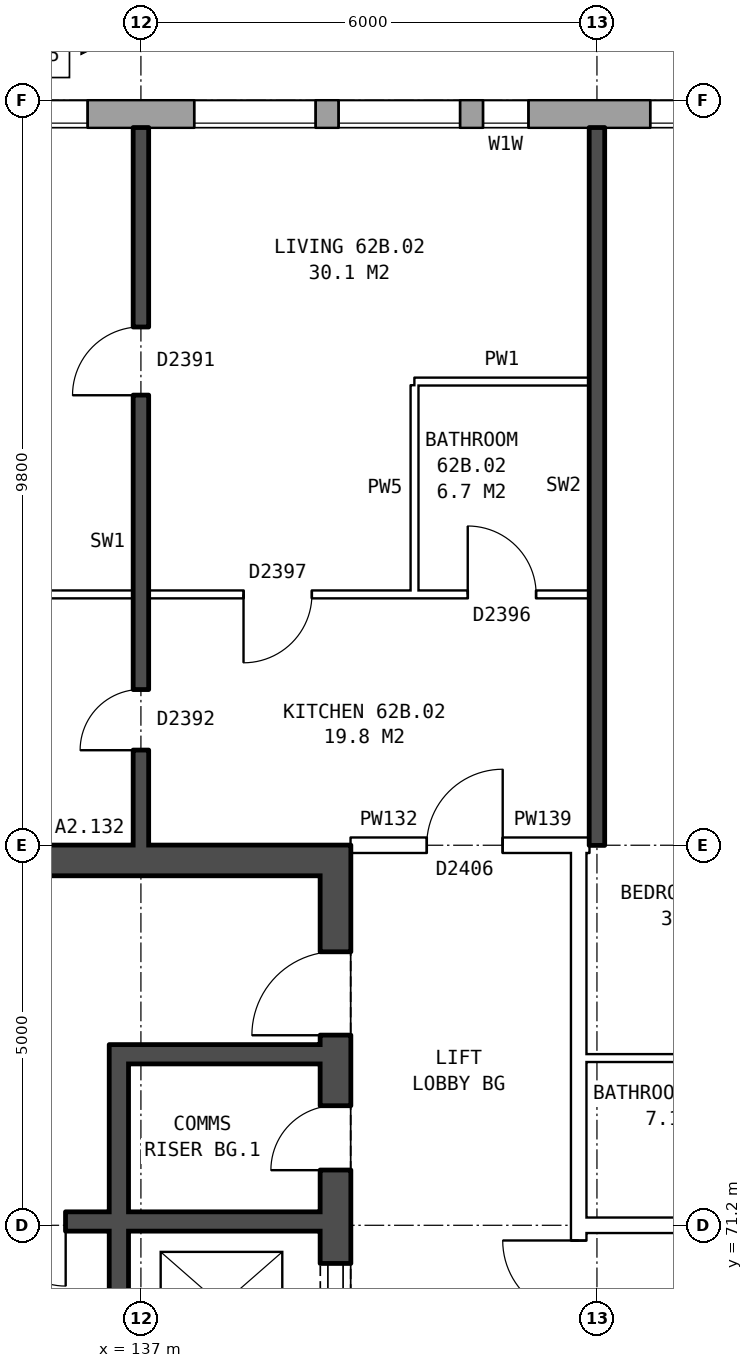
"""IFC4 building model, lengths in metres.
Left out: names, types, materials, properties, quantities, classifications, styles, units other than length and angle.
Written with IfcOpenShell. Run it as: python <this file> out.ifc"""

import sys

from ifc_helpers import new_model, si_unit, direction, frame, frame_2d, origin, place, context, subcontext, project, spatial, rectangle, extrude, element, fill, save


model = new_model("IFC4")
c1 = context("Model", 3, precision=1e-05, world=origin(), true_north=direction((0.0, 1.0)))
c2 = subcontext(c1, "Body", "Model", "MODEL_VIEW")
j1 = project(units=[si_unit("LENGTHUNIT", "METRE"), si_unit("PLANEANGLEUNIT", "RADIAN")], contexts=[c1])
p1 = place(None, origin())
s1 = spatial("IfcSite", under=j1, at=p1, CompositionType="ELEMENT")
p2 = place(p1, origin())
s2 = spatial("IfcBuilding", under=s1, at=p2, CompositionType="ELEMENT")
p3 = place(p2, frame((0.0, 0.0, 221.4)))
s3 = spatial("IfcBuildingStorey", under=s2, at=p3, CompositionType="ELEMENT", Elevation=221.4)
p4 = place(p3, frame((165.925, 85.82, 0.0), z_axis=(0.0, 0.0, 1.0), x_axis=(-1.0, 0.0, 0.0)))
e1 = element("IfcWall", 1, at=p4, inside=s3, PredefinedType="STANDARD", context=c2, shape_type="SweptSolid", body=[
    extrude(rectangle(XDim=33.875, YDim=0.36, at=frame_2d((16.938, 0.0))), origin(), (0.0, 0.0, 1.0), 2.85),
])
p5 = place(p4, frame((2.625, 0.0, 0.8)))
e2 = element("IfcOpeningElement", 2, at=p5, cuts=e1, PredefinedType="OPENING", context=c2, shape_type="SweptSolid", body=[
    extrude(rectangle(XDim=1.6, YDim=1.8, at=frame_2d((0.8, 0.9))), frame((0.0, 0.19, 0.0), z_axis=(0.0, -1.0, 0.0), x_axis=(1.0, 0.0, 0.0)), (0.0, 0.0, 1.0), 0.38),
])
p6 = place(p4, frame((5.625, 0.0, 0.8)))
e3 = element("IfcOpeningElement", 3, at=p6, cuts=e1, PredefinedType="OPENING", context=c2, shape_type="SweptSolid", body=[
    extrude(rectangle(XDim=1.6, YDim=1.8, at=frame_2d((0.8, 0.9))), frame((0.0, 0.19, 0.0), z_axis=(0.0, -1.0, 0.0), x_axis=(1.0, 0.0, 0.0)), (0.0, 0.0, 1.0), 0.38),
])
p7 = place(p4, frame((9.625, 0.0, 0.8)))
e4 = element("IfcOpeningElement", 4, at=p7, cuts=e1, PredefinedType="OPENING", context=c2, shape_type="SweptSolid", body=[
    extrude(rectangle(XDim=1.0, YDim=1.8, at=frame_2d((0.5, 0.9))), frame((0.0, 0.19, 0.0), z_axis=(0.0, -1.0, 0.0), x_axis=(1.0, 0.0, 0.0)), (0.0, 0.0, 1.0), 0.38),
])
p8 = place(p4, frame((11.625, 0.0, 0.8)))
e5 = element("IfcOpeningElement", 5, at=p8, cuts=e1, PredefinedType="OPENING", context=c2, shape_type="SweptSolid", body=[
    extrude(rectangle(XDim=1.6, YDim=1.8, at=frame_2d((0.8, 0.9))), frame((0.0, 0.19, 0.0), z_axis=(0.0, -1.0, 0.0), x_axis=(1.0, 0.0, 0.0)), (0.0, 0.0, 1.0), 0.38),
])
p9 = place(p4, frame((14.625, 0.0, 0.8)))
e6 = element("IfcOpeningElement", 6, at=p9, cuts=e1, PredefinedType="OPENING", context=c2, shape_type="SweptSolid", body=[
    extrude(rectangle(XDim=1.6, YDim=1.8, at=frame_2d((0.8, 0.9))), frame((0.0, 0.19, 0.0), z_axis=(0.0, -1.0, 0.0), x_axis=(1.0, 0.0, 0.0)), (0.0, 0.0, 1.0), 0.38),
])
p10 = place(p4, frame((17.625, 0.0, 0.8)))
e7 = element("IfcOpeningElement", 7, at=p10, cuts=e1, PredefinedType="OPENING", context=c2, shape_type="SweptSolid", body=[
    extrude(rectangle(XDim=1.6, YDim=1.8, at=frame_2d((0.8, 0.9))), frame((0.0, 0.19, 0.0), z_axis=(0.0, -1.0, 0.0), x_axis=(1.0, 0.0, 0.0)), (0.0, 0.0, 1.0), 0.38),
])
p11 = place(p4, frame((20.625, 0.0, 0.8)))
e8 = element("IfcOpeningElement", 8, at=p11, cuts=e1, PredefinedType="OPENING", context=c2, shape_type="SweptSolid", body=[
    extrude(rectangle(XDim=1.6, YDim=1.8, at=frame_2d((0.8, 0.9))), frame((0.0, 0.19, 0.0), z_axis=(0.0, -1.0, 0.0), x_axis=(1.0, 0.0, 0.0)), (0.0, 0.0, 1.0), 0.38),
])
p12 = place(p4, frame((23.825, 0.0, 1.7)))
e9 = element("IfcOpeningElement", 9, at=p12, cuts=e1, PredefinedType="OPENING", context=c2, shape_type="SweptSolid", body=[
    extrude(rectangle(XDim=0.6, YDim=0.9, at=frame_2d((0.3, 0.45))), frame((0.0, 0.19, 0.0), z_axis=(0.0, -1.0, 0.0), x_axis=(1.0, 0.0, 0.0)), (0.0, 0.0, 1.0), 0.38),
])
p13 = place(p4, frame((26.625, 0.0, 0.8)))
e10 = element("IfcOpeningElement", 10, at=p13, cuts=e1, PredefinedType="OPENING", context=c2, shape_type="SweptSolid", body=[
    extrude(rectangle(XDim=1.6, YDim=1.8, at=frame_2d((0.8, 0.9))), frame((0.0, 0.19, 0.0), z_axis=(0.0, -1.0, 0.0), x_axis=(1.0, 0.0, 0.0)), (0.0, 0.0, 1.0), 0.38),
])
p14 = place(p4, frame((29.625, 0.0, 0.8)))
e11 = element("IfcOpeningElement", 11, at=p14, cuts=e1, PredefinedType="OPENING", context=c2, shape_type="SweptSolid", body=[
    extrude(rectangle(XDim=1.6, YDim=1.8, at=frame_2d((0.8, 0.9))), frame((0.0, 0.19, 0.0), z_axis=(0.0, -1.0, 0.0), x_axis=(1.0, 0.0, 0.0)), (0.0, 0.0, 1.0), 0.38),
])
p15 = place(p4, frame((24.725, 0.0, 0.8)))
e12 = element("IfcOpeningElement", 12, at=p15, cuts=e1, PredefinedType="OPENING", context=c2, shape_type="SweptSolid", body=[
    extrude(rectangle(XDim=1.6, YDim=1.8, at=frame_2d((0.8, 0.9))), frame((0.0, 0.19, 0.0), z_axis=(0.0, -1.0, 0.0), x_axis=(1.0, 0.0, 0.0)), (0.0, 0.0, 1.0), 0.38),
])
p16 = place(p3, frame((139.56, 63.8, 0.0), z_axis=(0.0, 0.0, 1.0), x_axis=(0.0, 1.0, 0.0)))
e13 = element("IfcWall", 13, at=p16, inside=s3, PredefinedType="SHEAR", context=c2, shape_type="SweptSolid", body=[
    extrude(rectangle(XDim=12.4, YDim=0.4, at=frame_2d((6.2, 0.0))), origin(), (0.0, 0.0, 1.0), 2.85),
])
p17 = place(p16, frame((1.325, 0.0, 0.0)))
e14 = element("IfcOpeningElement", 14, at=p17, cuts=e13, PredefinedType="OPENING", context=c2, shape_type="SweptSolid", body=[
    extrude(rectangle(XDim=1.1, YDim=2.1, at=frame_2d((0.55, 1.05))), frame((0.0, 0.21, 0.0), z_axis=(0.0, -1.0, 0.0), x_axis=(1.0, 0.0, 0.0)), (0.0, 0.0, 1.0), 0.42),
])
p18 = place(p16, frame((3.6, 0.0, 0.0)))
e15 = element("IfcOpeningElement", 15, at=p18, cuts=e13, PredefinedType="OPENING", context=c2, shape_type="SweptSolid", body=[
    extrude(rectangle(XDim=1.1, YDim=2.1, at=frame_2d((0.55, 1.05))), frame((0.0, 0.21, 0.0), z_axis=(0.0, -1.0, 0.0), x_axis=(1.0, 0.0, 0.0)), (0.0, 0.0, 1.0), 0.42),
])
p19 = place(p16, frame((5.8, 0.0, 0.0)))
e16 = element("IfcOpeningElement", 16, at=p19, cuts=e13, PredefinedType="OPENING", context=c2, shape_type="SweptSolid", body=[
    extrude(rectangle(XDim=1.1, YDim=2.1, at=frame_2d((0.55, 1.05))), frame((0.0, 0.21, 0.0), z_axis=(0.0, -1.0, 0.0), x_axis=(1.0, 0.0, 0.0)), (0.0, 0.0, 1.0), 0.42),
])
p20 = place(p16, frame((9.9, 0.0, 0.0)))
e17 = element("IfcOpeningElement", 17, at=p20, cuts=e13, PredefinedType="OPENING", context=c2, shape_type="SweptSolid", body=[
    extrude(rectangle(XDim=1.1, YDim=2.1, at=frame_2d((0.55, 1.05))), frame((0.0, 0.21, 0.0), z_axis=(0.0, -1.0, 0.0), x_axis=(1.0, 0.0, 0.0)), (0.0, 0.0, 1.0), 0.42),
])
p21 = place(p16, frame((8.125, 0.0, 0.0)))
e18 = element("IfcOpeningElement", 18, at=p21, cuts=e13, PredefinedType="OPENING", context=c2, shape_type="SweptSolid", body=[
    extrude(rectangle(XDim=0.85, YDim=2.1, at=frame_2d((0.425, 1.05))), frame((0.0, 0.21, 0.0), z_axis=(0.0, -1.0, 0.0), x_axis=(1.0, 0.0, 0.0)), (0.0, 0.0, 1.0), 0.42),
])
p22 = place(p3, frame((139.36, 76.0, 0.0), z_axis=(0.0, 0.0, 1.0), x_axis=(-1.0, 0.0, 0.0)))
e19 = element("IfcWall", 19, at=p22, inside=s3, PredefinedType="SHEAR", context=c2, shape_type="SweptSolid", body=[
    extrude(rectangle(XDim=7.6, YDim=0.4, at=frame_2d((3.8, 0.0))), origin(), (0.0, 0.0, 1.0), 2.85),
])
p23 = place(p3, frame((139.36, 71.25, 0.0), z_axis=(0.0, 0.0, 1.0), x_axis=(-1.0, 0.0, 0.0)))
e20 = element("IfcWall", 20, at=p23, inside=s3, PredefinedType="SHEAR", context=c2, shape_type="SweptSolid", body=[
    extrude(rectangle(XDim=7.6, YDim=0.25, at=frame_2d((3.8, 0.0))), origin(), (0.0, 0.0, 1.0), 2.85),
])
p24 = place(p23, frame((5.175, 0.0, 0.0)))
e21 = element("IfcOpeningElement", 21, at=p24, cuts=e20, PredefinedType="OPENING", context=c2, shape_type="SweptSolid", body=[
    extrude(rectangle(XDim=1.1, YDim=2.1, at=frame_2d((0.55, 1.05))), frame((0.0, 0.135, 0.0), z_axis=(0.0, -1.0, 0.0), x_axis=(1.0, 0.0, 0.0)), (0.0, 0.0, 1.0), 0.27),
])
p25 = place(p23, frame((3.35, 0.0, 0.0)))
e22 = element("IfcOpeningElement", 22, at=p25, cuts=e20, PredefinedType="OPENING", context=c2, shape_type="SweptSolid", body=[
    extrude(rectangle(XDim=0.85, YDim=2.1, at=frame_2d((0.425, 1.05))), frame((0.0, 0.135, 0.0), z_axis=(0.0, -1.0, 0.0), x_axis=(1.0, 0.0, 0.0)), (0.0, 0.0, 1.0), 0.27),
])
p26 = place(p3, frame((139.36, 73.45, 0.0), z_axis=(0.0, 0.0, 1.0), x_axis=(-1.0, 0.0, 0.0)))
e23 = element("IfcWall", 23, at=p26, inside=s3, PredefinedType="SHEAR", context=c2, shape_type="SweptSolid", body=[
    extrude(rectangle(XDim=2.525, YDim=0.25, at=frame_2d((1.263, 0.0))), origin(), (0.0, 0.0, 1.0), 2.85),
])
p27 = place(p3, frame((136.71, 66.975, 0.0), z_axis=(0.0, 0.0, 1.0), x_axis=(0.0, 1.0, 0.0)))
e24 = element("IfcWall", 24, at=p27, inside=s3, PredefinedType="SHEAR", context=c2, shape_type="SweptSolid", body=[
    extrude(rectangle(XDim=4.15, YDim=0.25, at=frame_2d((2.075, 0.0))), origin(), (0.0, 0.0, 1.0), 2.85),
])
p28 = place(p3, frame((136.71, 71.375, 0.0), z_axis=(0.0, 0.0, 1.0), x_axis=(0.0, 1.0, 0.0)))
e25 = element("IfcWall", 25, at=p28, inside=s3, PredefinedType="SHEAR", context=c2, shape_type="SweptSolid", body=[
    extrude(rectangle(XDim=2.2, YDim=0.25, at=frame_2d((1.1, 0.0))), origin(), (0.0, 0.0, 1.0), 2.85),
])
p29 = place(p3, frame((142.76, 63.9, 0.0), z_axis=(0.0, 0.0, 1.0), x_axis=(0.0, 1.0, 0.0)))
e26 = element("IfcWall", 26, at=p29, inside=s3, PredefinedType="PARTITIONING", context=c2, shape_type="SweptSolid", body=[
    extrude(rectangle(XDim=12.2, YDim=0.2, at=frame_2d((6.1, 0.0))), origin(), (0.0, 0.0, 1.0), 2.85),
])
p30 = place(p29, frame((5.1, 0.0, 0.0)))
e27 = element("IfcOpeningElement", 27, at=p30, cuts=e26, PredefinedType="OPENING", context=c2, shape_type="SweptSolid", body=[
    extrude(rectangle(XDim=2.0, YDim=2.1, at=frame_2d((1.0, 1.05))), frame((0.0, 0.11, 0.0), z_axis=(0.0, -1.0, 0.0), x_axis=(1.0, 0.0, 0.0)), (0.0, 0.0, 1.0), 0.22),
])
p31 = place(p3, frame((142.76, 71.2, 0.0), z_axis=(0.0, 0.0, 1.0), x_axis=(1.0, 0.0, 0.0)))
e28 = element("IfcWall", 28, at=p31, inside=s3, PredefinedType="PARTITIONING", context=c2, shape_type="SweptSolid", body=[
    extrude(rectangle(XDim=14.48, YDim=0.2, at=frame_2d((7.24, 0.0))), origin(), (0.0, 0.0, 1.0), 2.85),
])
p32 = place(p31, frame((4.24, 0.0, 0.0)))
e29 = element("IfcOpeningElement", 29, at=p32, cuts=e28, PredefinedType="OPENING", context=c2, shape_type="SweptSolid", body=[
    extrude(rectangle(XDim=1.0, YDim=2.1, at=frame_2d((0.5, 1.05))), frame((0.0, 0.11, 0.0), z_axis=(0.0, -1.0, 0.0), x_axis=(1.0, 0.0, 0.0)), (0.0, 0.0, 1.0), 0.22),
])
p33 = place(p31, frame((10.24, 0.0, 0.0)))
e30 = element("IfcOpeningElement", 30, at=p33, cuts=e28, PredefinedType="OPENING", context=c2, shape_type="SweptSolid", body=[
    extrude(rectangle(XDim=1.0, YDim=2.1, at=frame_2d((0.5, 1.05))), frame((0.0, 0.11, 0.0), z_axis=(0.0, -1.0, 0.0), x_axis=(1.0, 0.0, 0.0)), (0.0, 0.0, 1.0), 0.22),
])
p34 = place(p3, frame((142.76, 73.4, 0.0), z_axis=(0.0, 0.0, 1.0), x_axis=(1.0, 0.0, 0.0)))
e31 = element("IfcWall", 31, at=p34, inside=s3, PredefinedType="PARTITIONING", context=c2, shape_type="SweptSolid", body=[
    extrude(rectangle(XDim=3.24, YDim=0.1, at=frame_2d((1.62, 0.0))), origin(), (0.0, 0.0, 1.0), 2.85),
])
p35 = place(p3, frame((139.76, 76.2, 0.0), z_axis=(0.0, 0.0, 1.0), x_axis=(1.0, 0.0, 0.0)))
e32 = element("IfcWall", 32, at=p35, inside=s3, PredefinedType="PARTITIONING", context=c2, shape_type="SweptSolid", body=[
    extrude(rectangle(XDim=3.0, YDim=0.2, at=frame_2d((1.5, 0.0))), origin(), (0.0, 0.0, 1.0), 2.85),
])
p36 = place(p35, frame((1.0, 0.0, 0.0)))
e33 = element("IfcOpeningElement", 33, at=p36, cuts=e32, PredefinedType="OPENING", context=c2, shape_type="SweptSolid", body=[
    extrude(rectangle(XDim=1.0, YDim=2.1, at=frame_2d((0.5, 1.05))), frame((0.0, 0.11, 0.0), z_axis=(0.0, -1.0, 0.0), x_axis=(1.0, 0.0, 0.0)), (0.0, 0.0, 1.0), 0.22),
])
p37 = place(p3, frame((142.76, 76.2, 0.0), z_axis=(0.0, 0.0, 1.0), x_axis=(1.0, 0.0, 0.0)))
e34 = element("IfcWall", 34, at=p37, inside=s3, PredefinedType="PARTITIONING", context=c2, shape_type="SweptSolid", body=[
    extrude(rectangle(XDim=0.14, YDim=0.2, at=frame_2d((0.07, 0.0))), origin(), (0.0, 0.0, 1.0), 2.85),
])
p38 = place(p3, frame((131.1, 79.5, 0.0), z_axis=(0.0, 0.0, 1.0), x_axis=(1.0, 0.0, 0.0)))
e35 = element("IfcWall", 35, at=p38, inside=s3, PredefinedType="PARTITIONING", context=c2, shape_type="SweptSolid", body=[
    extrude(rectangle(XDim=11.8, YDim=0.1, at=frame_2d((5.9, 0.0))), origin(), (0.0, 0.0, 1.0), 2.85),
])
p39 = place(p38, frame((7.25, 0.0, 0.0)))
e36 = element("IfcOpeningElement", 36, at=p39, cuts=e35, PredefinedType="OPENING", context=c2, shape_type="SweptSolid", body=[
    extrude(rectangle(XDim=0.9, YDim=2.1, at=frame_2d((0.45, 1.05))), frame((0.0, 0.06, 0.0), z_axis=(0.0, -1.0, 0.0), x_axis=(1.0, 0.0, 0.0)), (0.0, 0.0, 1.0), 0.12),
])
p40 = place(p38, frame((10.2, 0.0, 0.0)))
e37 = element("IfcOpeningElement", 37, at=p40, cuts=e35, PredefinedType="OPENING", context=c2, shape_type="SweptSolid", body=[
    extrude(rectangle(XDim=0.9, YDim=2.1, at=frame_2d((0.45, 1.05))), frame((0.0, 0.06, 0.0), z_axis=(0.0, -1.0, 0.0), x_axis=(1.0, 0.0, 0.0)), (0.0, 0.0, 1.0), 0.12),
])
p41 = place(p3, frame((140.6, 82.3, 0.0), z_axis=(0.0, 0.0, 1.0), x_axis=(1.0, 0.0, 0.0)))
e38 = element("IfcWall", 38, at=p41, inside=s3, PredefinedType="PARTITIONING", context=c2, shape_type="SweptSolid", body=[
    extrude(rectangle(XDim=2.3, YDim=0.1, at=frame_2d((1.15, 0.0))), origin(), (0.0, 0.0, 1.0), 2.85),
])
p42 = place(p3, frame((137.0, 76.2, 0.0), z_axis=(0.0, 0.0, 1.0), x_axis=(0.0, 1.0, 0.0)))
e39 = element("IfcWall", 39, at=p42, inside=s3, PredefinedType="SOLIDWALL", context=c2, shape_type="SweptSolid", body=[
    extrude(rectangle(XDim=9.44, YDim=0.2, at=frame_2d((4.72, 0.0))), origin(), (0.0, 0.0, 1.0), 2.85),
])
p43 = place(p42, frame((5.92, 0.0, 0.0)))
e40 = element("IfcOpeningElement", 40, at=p43, cuts=e39, PredefinedType="OPENING", context=c2, shape_type="SweptSolid", body=[
    extrude(rectangle(XDim=0.9, YDim=2.1, at=frame_2d((0.45, 1.05))), frame((0.0, 0.11, 0.0), z_axis=(0.0, -1.0, 0.0), x_axis=(1.0, 0.0, 0.0)), (0.0, 0.0, 1.0), 0.22),
])
p44 = place(p42, frame((1.25, 0.0, 0.0)))
e41 = element("IfcOpeningElement", 41, at=p44, cuts=e39, PredefinedType="OPENING", context=c2, shape_type="SweptSolid", body=[
    extrude(rectangle(XDim=0.8, YDim=2.1, at=frame_2d((0.4, 1.05))), frame((0.0, 0.11, 0.0), z_axis=(0.0, -1.0, 0.0), x_axis=(1.0, 0.0, 0.0)), (0.0, 0.0, 1.0), 0.22),
])
p45 = place(p3, frame((140.6, 79.55, 0.0), z_axis=(0.0, 0.0, 1.0), x_axis=(0.0, 1.0, 0.0)))
e42 = element("IfcWall", 42, at=p45, inside=s3, PredefinedType="PARTITIONING", context=c2, shape_type="SweptSolid", body=[
    extrude(rectangle(XDim=2.7, YDim=0.1, at=frame_2d((1.35, 0.0))), origin(), (0.0, 0.0, 1.0), 2.85),
])
p46 = place(p3, frame((143.0, 76.2, 0.0), z_axis=(0.0, 0.0, 1.0), x_axis=(0.0, 1.0, 0.0)))
e43 = element("IfcWall", 43, at=p46, inside=s3, PredefinedType="SOLIDWALL", context=c2, shape_type="SweptSolid", body=[
    extrude(rectangle(XDim=9.44, YDim=0.2, at=frame_2d((4.72, 0.0))), origin(), (0.0, 0.0, 1.0), 2.85),
])
p47 = place(p11, origin())
e44 = element("IfcWindow", 44, at=p47, inside=s3, PartitioningType="SINGLE_PANEL", PredefinedType="WINDOW", context=c2, shape_type="SweptSolid", body=[
    extrude(rectangle(XDim=1.6, YDim=1.8, at=frame_2d((0.8, 0.9))), frame((0.0, 0.15, 0.0), z_axis=(0.0, -1.0, 0.0), x_axis=(1.0, 0.0, 0.0)), (0.0, 0.0, 1.0), 0.06),
])
fill(e8, e44)
p48 = place(p12, origin())
e45 = element("IfcWindow", 45, at=p48, inside=s3, PartitioningType="SINGLE_PANEL", PredefinedType="WINDOW", context=c2, shape_type="SweptSolid", body=[
    extrude(rectangle(XDim=0.6, YDim=0.9, at=frame_2d((0.3, 0.45))), frame((0.0, 0.15, 0.0), z_axis=(0.0, -1.0, 0.0), x_axis=(1.0, 0.0, 0.0)), (0.0, 0.0, 1.0), 0.06),
])
fill(e9, e45)
p49 = place(p13, origin())
e46 = element("IfcWindow", 46, at=p49, inside=s3, PartitioningType="SINGLE_PANEL", PredefinedType="WINDOW", context=c2, shape_type="SweptSolid", body=[
    extrude(rectangle(XDim=1.6, YDim=1.8, at=frame_2d((0.8, 0.9))), frame((0.0, 0.15, 0.0), z_axis=(0.0, -1.0, 0.0), x_axis=(1.0, 0.0, 0.0)), (0.0, 0.0, 1.0), 0.06),
])
fill(e10, e46)
p50 = place(p14, origin())
e47 = element("IfcWindow", 47, at=p50, inside=s3, PartitioningType="SINGLE_PANEL", PredefinedType="WINDOW", context=c2, shape_type="SweptSolid", body=[
    extrude(rectangle(XDim=1.6, YDim=1.8, at=frame_2d((0.8, 0.9))), frame((0.0, 0.15, 0.0), z_axis=(0.0, -1.0, 0.0), x_axis=(1.0, 0.0, 0.0)), (0.0, 0.0, 1.0), 0.06),
])
fill(e11, e47)
p51 = place(p19, origin())
e48 = element("IfcDoor", 48, at=p51, inside=s3, OperationType="DOUBLE_DOOR_SLIDING", PredefinedType="DOOR", context=c2, shape_type="SweptSolid", body=[
    extrude(rectangle(XDim=1.1, YDim=2.1, at=frame_2d((0.55, 1.05))), frame((0.0, 0.185, 0.0), z_axis=(0.0, -1.0, 0.0), x_axis=(1.0, 0.0, 0.0)), (0.0, 0.0, 1.0), 0.05),
])
fill(e16, e48)
p52 = place(p20, origin())
e49 = element("IfcDoor", 49, at=p52, inside=s3, OperationType="SINGLE_SWING_LEFT", PredefinedType="DOOR", context=c2, shape_type="SweptSolid", body=[
    extrude(rectangle(XDim=1.1, YDim=2.1, at=frame_2d((0.55, 1.05))), frame((0.0, 0.185, 0.0), z_axis=(0.0, -1.0, 0.0), x_axis=(1.0, 0.0, 0.0)), (0.0, 0.0, 1.0), 0.05),
])
fill(e17, e49)
p53 = place(p21, origin())
e50 = element("IfcDoor", 50, at=p53, inside=s3, OperationType="SINGLE_SWING_LEFT", PredefinedType="DOOR", context=c2, shape_type="SweptSolid", body=[
    extrude(rectangle(XDim=0.85, YDim=2.1, at=frame_2d((0.425, 1.05))), frame((0.0, 0.185, 0.0), z_axis=(0.0, -1.0, 0.0), x_axis=(1.0, 0.0, 0.0)), (0.0, 0.0, 1.0), 0.05),
])
fill(e18, e50)
p54 = place(p25, origin())
e51 = element("IfcDoor", 51, at=p54, inside=s3, OperationType="SINGLE_SWING_LEFT", PredefinedType="DOOR", context=c2, shape_type="SweptSolid", body=[
    extrude(rectangle(XDim=0.85, YDim=2.1, at=frame_2d((0.425, 1.05))), frame((0.0, 0.025, 0.0), z_axis=(0.0, -1.0, 0.0), x_axis=(1.0, 0.0, 0.0)), (0.0, 0.0, 1.0), 0.05),
])
fill(e22, e51)
p55 = place(p30, origin())
e52 = element("IfcDoor", 52, at=p55, inside=s3, OperationType="DOUBLE_DOOR_SINGLE_SWING", PredefinedType="DOOR", context=c2, shape_type="SweptSolid", body=[
    extrude(rectangle(XDim=2.0, YDim=2.1, at=frame_2d((1.0, 1.05))), frame((0.0, 0.025, 0.0), z_axis=(0.0, -1.0, 0.0), x_axis=(1.0, 0.0, 0.0)), (0.0, 0.0, 1.0), 0.05),
])
fill(e27, e52)
p56 = place(p43, origin())
e53 = element("IfcDoor", 53, at=p56, inside=s3, OperationType="SINGLE_SWING_LEFT", PredefinedType="DOOR", context=c2, shape_type="SweptSolid", body=[
    extrude(rectangle(XDim=0.9, YDim=2.1, at=frame_2d((0.45, 1.05))), frame((0.0, 0.025, 0.0), z_axis=(0.0, -1.0, 0.0), x_axis=(1.0, 0.0, 0.0)), (0.0, 0.0, 1.0), 0.05),
])
fill(e40, e53)
p57 = place(p36, origin())
e54 = element("IfcDoor", 54, at=p57, inside=s3, OperationType="SINGLE_SWING_RIGHT", PredefinedType="DOOR", context=c2, shape_type="SweptSolid", body=[
    extrude(rectangle(XDim=1.0, YDim=2.1, at=frame_2d((0.5, 1.05))), frame((0.0, 0.025, 0.0), z_axis=(0.0, -1.0, 0.0), x_axis=(1.0, 0.0, 0.0)), (0.0, 0.0, 1.0), 0.05),
])
fill(e33, e54)
p58 = place(p39, frame((0.9, 0.0, 0.0), z_axis=(0.0, 0.0, 1.0), x_axis=(-1.0, 0.0, 0.0)))
e55 = element("IfcDoor", 55, at=p58, inside=s3, OperationType="SINGLE_SWING_RIGHT", PredefinedType="DOOR", context=c2, shape_type="SweptSolid", body=[
    extrude(rectangle(XDim=0.9, YDim=2.1, at=frame_2d((0.45, 1.05))), frame((0.0, 0.025, 0.0), z_axis=(0.0, -1.0, 0.0), x_axis=(1.0, 0.0, 0.0)), (0.0, 0.0, 1.0), 0.05),
])
fill(e36, e55)
p59 = place(p44, origin())
e56 = element("IfcDoor", 56, at=p59, inside=s3, OperationType="SINGLE_SWING_LEFT", PredefinedType="DOOR", context=c2, shape_type="SweptSolid", body=[
    extrude(rectangle(XDim=0.8, YDim=2.1, at=frame_2d((0.4, 1.05))), frame((0.0, 0.025, 0.0), z_axis=(0.0, -1.0, 0.0), x_axis=(1.0, 0.0, 0.0)), (0.0, 0.0, 1.0), 0.05),
])
fill(e41, e56)
p60 = place(p40, origin())
e57 = element("IfcDoor", 57, at=p60, inside=s3, OperationType="SINGLE_SWING_LEFT", PredefinedType="DOOR", context=c2, shape_type="SweptSolid", body=[
    extrude(rectangle(XDim=0.9, YDim=2.1, at=frame_2d((0.45, 1.05))), frame((0.0, 0.025, 0.0), z_axis=(0.0, -1.0, 0.0), x_axis=(1.0, 0.0, 0.0)), (0.0, 0.0, 1.0), 0.05),
])
fill(e37, e57)
p61 = place(p15, origin())
e58 = element("IfcWindow", 58, at=p61, inside=s3, PartitioningType="SINGLE_PANEL", PredefinedType="WINDOW", context=c2, shape_type="SweptSolid", body=[
    extrude(rectangle(XDim=1.6, YDim=1.8, at=frame_2d((0.8, 0.9))), frame((0.0, 0.15, 0.0), z_axis=(0.0, -1.0, 0.0), x_axis=(1.0, 0.0, 0.0)), (0.0, 0.0, 1.0), 0.06),
])
fill(e12, e58)
save(model, sys.argv[1])
